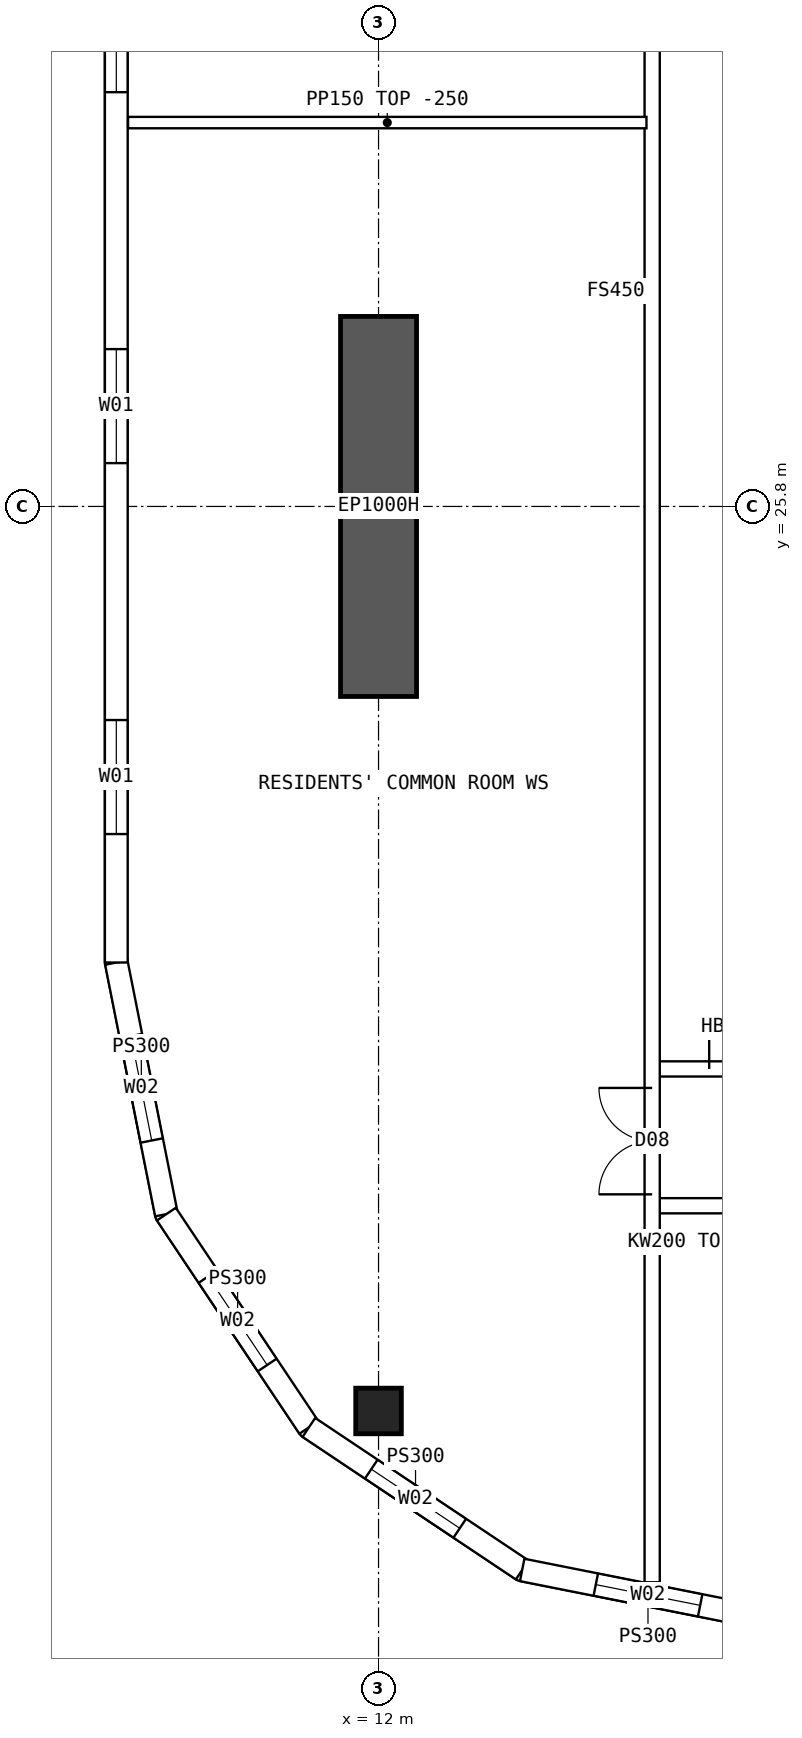
"""IFC4 building model, lengths in metres.
Left out: names, types, materials, properties, quantities, classifications, styles, units other than length and angle.
Written with IfcOpenShell. Run it as: python <this file> out.ifc"""

import sys

from ifc_helpers import new_model, si_unit, direction, frame, frame_2d, origin, origin_2d, place, context, subcontext, project, spatial, polyline, rectangle, hollow_rectangle, outline, extrude, element, fill, save


model = new_model("IFC4")
c1 = context("Model", 3, precision=1e-05, world=origin(), true_north=direction((0.0, 1.0)))
c2 = subcontext(c1, "Body", "Model", "MODEL_VIEW")
j1 = project(units=[si_unit("LENGTHUNIT", "METRE"), si_unit("PLANEANGLEUNIT", "RADIAN")], contexts=[c1])
p1 = place(None, origin())
s1 = spatial("IfcSite", under=j1, at=p1, CompositionType="ELEMENT")
p2 = place(p1, origin())
s2 = spatial("IfcBuilding", under=s1, at=p2, CompositionType="ELEMENT")
p3 = place(p2, frame((0.0, 0.0, 246.55)))
s3 = spatial("IfcBuildingStorey", under=s2, at=p3, CompositionType="ELEMENT", Elevation=246.55)
p4 = place(p3, frame((12.0, 13.9, 0.0), z_axis=(0.0, 0.0, 1.0), x_axis=(1.0, 0.0, 0.0)))
e1 = element("IfcColumn", 1, at=p4, inside=s3, PredefinedType="COLUMN", context=c2, shape_type="SweptSolid", body=[
    extrude(hollow_rectangle(XDim=0.6, YDim=0.6, WallThickness=0.06, at=origin_2d()), origin(), (0.0, 0.0, 1.0), 3.75),
])
p5 = place(p3, frame((12.0, 23.3, 0.0), z_axis=(0.0, 0.0, 1.0), x_axis=(0.0, 1.0, 0.0)))
e2 = element("IfcWall", 2, at=p5, inside=s3, PredefinedType="SHEAR", context=c2, shape_type="SweptSolid", body=[
    extrude(rectangle(XDim=5.0, YDim=1.0, at=frame_2d((2.5, 0.0))), origin(), (0.0, 0.0, 1.0), 3.75),
])
p6 = place(p3, frame((8.55, 44.2, 0.0), z_axis=(0.0, 0.0, 1.0), x_axis=(0.0, -1.0, 0.0)))
e3 = element("IfcWall", 3, at=p6, inside=s3, PredefinedType="SOLIDWALL", context=c2, shape_type="SweptSolid", body=[
    extrude(outline(polyline([(-0.015, -0.15), (24.415, -0.15), (24.385, 0.15), (0.015, 0.15), (-0.015, -0.15)])), origin(), (0.0, 0.0, 1.0), 3.5),
])
p7 = place(p6, frame((1.69, 0.0, 0.9)))
e4 = element("IfcOpeningElement", 4, at=p7, cuts=e3, PredefinedType="OPENING", context=c2, shape_type="SweptSolid", body=[
    extrude(rectangle(XDim=1.5, YDim=2.0, at=frame_2d((0.75, 1.0))), frame((0.0, 0.16, 0.0), z_axis=(0.0, -1.0, 0.0), x_axis=(1.0, 0.0, 0.0)), (0.0, 0.0, 1.0), 0.32),
])
p8 = place(p6, frame((6.57, 0.0, 0.9)))
e5 = element("IfcOpeningElement", 5, at=p8, cuts=e3, PredefinedType="OPENING", context=c2, shape_type="SweptSolid", body=[
    extrude(rectangle(XDim=1.5, YDim=2.0, at=frame_2d((0.75, 1.0))), frame((0.0, 0.16, 0.0), z_axis=(0.0, -1.0, 0.0), x_axis=(1.0, 0.0, 0.0)), (0.0, 0.0, 1.0), 0.32),
])
p9 = place(p6, frame((11.45, 0.0, 0.9)))
e6 = element("IfcOpeningElement", 6, at=p9, cuts=e3, PredefinedType="OPENING", context=c2, shape_type="SweptSolid", body=[
    extrude(rectangle(XDim=1.5, YDim=2.0, at=frame_2d((0.75, 1.0))), frame((0.0, 0.16, 0.0), z_axis=(0.0, -1.0, 0.0), x_axis=(1.0, 0.0, 0.0)), (0.0, 0.0, 1.0), 0.32),
])
p10 = place(p6, frame((16.33, 0.0, 0.9)))
e7 = element("IfcOpeningElement", 7, at=p10, cuts=e3, PredefinedType="OPENING", context=c2, shape_type="SweptSolid", body=[
    extrude(rectangle(XDim=1.5, YDim=2.0, at=frame_2d((0.75, 1.0))), frame((0.0, 0.16, 0.0), z_axis=(0.0, -1.0, 0.0), x_axis=(1.0, 0.0, 0.0)), (0.0, 0.0, 1.0), 0.32),
])
p11 = place(p6, frame((21.21, 0.0, 0.9)))
e8 = element("IfcOpeningElement", 8, at=p11, cuts=e3, PredefinedType="OPENING", context=c2, shape_type="SweptSolid", body=[
    extrude(rectangle(XDim=1.5, YDim=2.0, at=frame_2d((0.75, 1.0))), frame((0.0, 0.16, 0.0), z_axis=(0.0, -1.0, 0.0), x_axis=(1.0, 0.0, 0.0)), (0.0, 0.0, 1.0), 0.32),
])
p12 = place(p3, frame((8.55, 19.8, 0.0), z_axis=(0.0, 0.0, 1.0), x_axis=(0.19508664885, -0.980786011034, 0.0)))
e9 = element("IfcWall", 9, at=p12, inside=s3, PredefinedType="SOLIDWALL", context=c2, shape_type="SweptSolid", body=[
    extrude(outline(polyline([(-0.015, -0.15), (3.405, -0.15), (3.345, 0.15), (0.015, 0.15), (-0.015, -0.15)])), origin(), (0.0, 0.0, 1.0), 3.5),
])
p13 = place(p12, frame((0.988, 0.0, 0.9)))
e10 = element("IfcOpeningElement", 10, at=p13, cuts=e9, PredefinedType="OPENING", context=c2, shape_type="SweptSolid", body=[
    extrude(rectangle(XDim=1.4, YDim=1.8, at=frame_2d((0.7, 0.9))), frame((0.0, 0.16, 0.0), z_axis=(0.0, -1.0, 0.0), x_axis=(1.0, 0.0, 0.0)), (0.0, 0.0, 1.0), 0.32),
])
p14 = place(p3, frame((9.208, 16.49, 0.0), z_axis=(0.0, 0.0, 1.0), x_axis=(0.555567969291, -0.831471124873, 0.0)))
e11 = element("IfcWall", 11, at=p14, inside=s3, PredefinedType="SOLIDWALL", context=c2, shape_type="SweptSolid", body=[
    extrude(outline(polyline([(-0.03, -0.15), (3.405, -0.15), (3.345, 0.15), (0.03, 0.15), (-0.03, -0.15)])), origin(), (0.0, 0.0, 1.0), 3.5),
])
p15 = place(p14, frame((0.988, 0.0, 0.9)))
e12 = element("IfcOpeningElement", 12, at=p15, cuts=e11, PredefinedType="OPENING", context=c2, shape_type="SweptSolid", body=[
    extrude(rectangle(XDim=1.4, YDim=1.8, at=frame_2d((0.7, 0.9))), frame((0.0, 0.16, 0.0), z_axis=(0.0, -1.0, 0.0), x_axis=(1.0, 0.0, 0.0)), (0.0, 0.0, 1.0), 0.32),
])
p16 = place(p3, frame((11.083, 13.684, 0.0), z_axis=(0.0, 0.0, 1.0), x_axis=(0.831460037396, -0.555584562613, 0.0)))
e13 = element("IfcWall", 13, at=p16, inside=s3, PredefinedType="SOLIDWALL", context=c2, shape_type="SweptSolid", body=[
    extrude(outline(polyline([(-0.03, -0.15), (3.405, -0.15), (3.345, 0.15), (0.03, 0.15), (-0.03, -0.15)])), origin(), (0.0, 0.0, 1.0), 3.5),
])
p17 = place(p16, frame((0.988, 0.0, 0.9)))
e14 = element("IfcOpeningElement", 14, at=p17, cuts=e13, PredefinedType="OPENING", context=c2, shape_type="SweptSolid", body=[
    extrude(rectangle(XDim=1.4, YDim=1.8, at=frame_2d((0.7, 0.9))), frame((0.0, 0.16, 0.0), z_axis=(0.0, -1.0, 0.0), x_axis=(1.0, 0.0, 0.0)), (0.0, 0.0, 1.0), 0.32),
])
p18 = place(p3, frame((13.89, 11.808, 0.0), z_axis=(0.0, 0.0, 1.0), x_axis=(0.98078325777, -0.195100490205, 0.0)))
e15 = element("IfcWall", 15, at=p18, inside=s3, PredefinedType="SOLIDWALL", context=c2, shape_type="SweptSolid", body=[
    extrude(outline(polyline([(-0.03, -0.15), (3.405, -0.15), (3.345, 0.15), (0.03, 0.15), (-0.03, -0.15)])), origin(), (0.0, 0.0, 1.0), 3.5),
])
p19 = place(p18, frame((0.988, 0.0, 0.9)))
e16 = element("IfcOpeningElement", 16, at=p19, cuts=e15, PredefinedType="OPENING", context=c2, shape_type="SweptSolid", body=[
    extrude(rectangle(XDim=1.4, YDim=1.8, at=frame_2d((0.7, 0.9))), frame((0.0, 0.16, 0.0), z_axis=(0.0, -1.0, 0.0), x_axis=(1.0, 0.0, 0.0)), (0.0, 0.0, 1.0), 0.32),
])
p20 = place(p3, frame((15.6, 16.6, 0.0), z_axis=(0.0, 0.0, 1.0), x_axis=(1.0, 0.0, 0.0)))
e17 = element("IfcWall", 17, at=p20, inside=s3, PredefinedType="SOLIDWALL", context=c2, shape_type="SweptSolid", body=[
    extrude(rectangle(XDim=2.05, YDim=0.2, at=frame_2d((1.025, 0.0))), origin(), (0.0, 0.0, 1.0), 3.5),
])
p21 = place(p20, frame((0.95, 0.0, 0.0)))
e18 = element("IfcOpeningElement", 18, at=p21, cuts=e17, PredefinedType="OPENING", context=c2, shape_type="SweptSolid", body=[
    extrude(rectangle(XDim=0.9, YDim=2.1, at=frame_2d((0.45, 1.05))), frame((0.0, 0.11, 0.0), z_axis=(0.0, -1.0, 0.0), x_axis=(1.0, 0.0, 0.0)), (0.0, 0.0, 1.0), 0.22),
])
p22 = place(p3, frame((15.6, 18.4, 0.0), z_axis=(0.0, 0.0, 1.0), x_axis=(1.0, 0.0, 0.0)))
e19 = element("IfcWall", 19, at=p22, inside=s3, PredefinedType="SOLIDWALL", context=c2, shape_type="SweptSolid", body=[
    extrude(rectangle(XDim=2.05, YDim=0.2, at=frame_2d((1.025, 0.0))), origin(), (0.0, 0.0, 1.0), 3.5),
])
p23 = place(p22, frame((0.75, 0.0, 0.0)))
e20 = element("IfcOpeningElement", 20, at=p23, cuts=e19, PredefinedType="OPENING", context=c2, shape_type="SweptSolid", body=[
    extrude(rectangle(XDim=1.2, YDim=2.1, at=frame_2d((0.6, 1.05))), frame((0.0, 0.11, 0.0), z_axis=(0.0, -1.0, 0.0), x_axis=(1.0, 0.0, 0.0)), (0.0, 0.0, 1.0), 0.22),
])
p24 = place(p3, frame((8.705, 30.85, 0.0), z_axis=(0.0, 0.0, 1.0), x_axis=(1.0, 0.0, 0.0)))
e21 = element("IfcWall", 21, at=p24, inside=s3, PredefinedType="PARTITIONING", context=c2, shape_type="SweptSolid", body=[
    extrude(outline(polyline([(0.0, 0.0), (6.82, 0.0), (6.82, 3.5), (3.597, 3.5), (3.595, 3.05), (2.997, 3.05), (2.995, 3.5), (0.0, 3.5), (0.0, 0.0)])), frame((0.0, 0.075, 0.0), z_axis=(0.0, -1.0, 0.0), x_axis=(1.0, 0.0, 0.0)), (0.0, 0.0, 1.0), 0.15),
])
p25 = place(p3, frame((15.6, 11.646, 0.0), z_axis=(0.0, 0.0, 1.0), x_axis=(0.0, 1.0, 0.0)))
e22 = element("IfcWall", 22, at=p25, inside=s3, PredefinedType="SOLIDWALL", context=c2, shape_type="SweptSolid", body=[
    extrude(rectangle(XDim=40.708, YDim=0.2, at=frame_2d((20.354, 0.0))), origin(), (0.0, 0.0, 1.0), 3.5),
])
p26 = place(p25, frame((5.104, 0.0, 0.0)))
e23 = element("IfcOpeningElement", 23, at=p26, cuts=e22, PredefinedType="OPENING", context=c2, shape_type="SweptSolid", body=[
    extrude(rectangle(XDim=1.4, YDim=2.1, at=frame_2d((0.7, 1.05))), frame((0.0, 0.11, 0.0), z_axis=(0.0, -1.0, 0.0), x_axis=(1.0, 0.0, 0.0)), (0.0, 0.0, 1.0), 0.22),
])
p27 = place(p25, frame((34.104, 0.0, 0.0)))
e24 = element("IfcOpeningElement", 24, at=p27, cuts=e22, PredefinedType="OPENING", context=c2, shape_type="SweptSolid", body=[
    extrude(rectangle(XDim=1.4, YDim=2.1, at=frame_2d((0.7, 1.05))), frame((0.0, 0.11, 0.0), z_axis=(0.0, -1.0, 0.0), x_axis=(1.0, 0.0, 0.0)), (0.0, 0.0, 1.0), 0.22),
])
p28 = place(p9, origin())
e25 = element("IfcWindow", 25, at=p28, inside=s3, PartitioningType="SINGLE_PANEL", PredefinedType="WINDOW", context=c2, shape_type="SweptSolid", body=[
    extrude(rectangle(XDim=1.5, YDim=2.0, at=frame_2d((0.75, 1.0))), frame((0.0, 0.03, 0.0), z_axis=(0.0, -1.0, 0.0), x_axis=(1.0, 0.0, 0.0)), (0.0, 0.0, 1.0), 0.06),
])
fill(e6, e25)
p29 = place(p10, origin())
e26 = element("IfcWindow", 26, at=p29, inside=s3, PartitioningType="SINGLE_PANEL", PredefinedType="WINDOW", context=c2, shape_type="SweptSolid", body=[
    extrude(rectangle(XDim=1.5, YDim=2.0, at=frame_2d((0.75, 1.0))), frame((0.0, 0.03, 0.0), z_axis=(0.0, -1.0, 0.0), x_axis=(1.0, 0.0, 0.0)), (0.0, 0.0, 1.0), 0.06),
])
fill(e7, e26)
p30 = place(p11, origin())
e27 = element("IfcWindow", 27, at=p30, inside=s3, PartitioningType="SINGLE_PANEL", PredefinedType="WINDOW", context=c2, shape_type="SweptSolid", body=[
    extrude(rectangle(XDim=1.5, YDim=2.0, at=frame_2d((0.75, 1.0))), frame((0.0, 0.03, 0.0), z_axis=(0.0, -1.0, 0.0), x_axis=(1.0, 0.0, 0.0)), (0.0, 0.0, 1.0), 0.06),
])
fill(e8, e27)
p31 = place(p13, origin())
e28 = element("IfcWindow", 28, at=p31, inside=s3, PartitioningType="SINGLE_PANEL", PredefinedType="WINDOW", context=c2, shape_type="SweptSolid", body=[
    extrude(rectangle(XDim=1.4, YDim=1.8, at=frame_2d((0.7, 0.9))), frame((0.0, 0.03, 0.0), z_axis=(0.0, -1.0, 0.0), x_axis=(1.0, 0.0, 0.0)), (0.0, 0.0, 1.0), 0.06),
])
fill(e10, e28)
p32 = place(p15, origin())
e29 = element("IfcWindow", 29, at=p32, inside=s3, PartitioningType="SINGLE_PANEL", PredefinedType="WINDOW", context=c2, shape_type="SweptSolid", body=[
    extrude(rectangle(XDim=1.4, YDim=1.8, at=frame_2d((0.7, 0.9))), frame((0.0, 0.03, 0.0), z_axis=(0.0, -1.0, 0.0), x_axis=(1.0, 0.0, 0.0)), (0.0, 0.0, 1.0), 0.06),
])
fill(e12, e29)
p33 = place(p17, origin())
e30 = element("IfcWindow", 30, at=p33, inside=s3, PartitioningType="SINGLE_PANEL", PredefinedType="WINDOW", context=c2, shape_type="SweptSolid", body=[
    extrude(rectangle(XDim=1.4, YDim=1.8, at=frame_2d((0.7, 0.9))), frame((0.0, 0.03, 0.0), z_axis=(0.0, -1.0, 0.0), x_axis=(1.0, 0.0, 0.0)), (0.0, 0.0, 1.0), 0.06),
])
fill(e14, e30)
p34 = place(p19, origin())
e31 = element("IfcWindow", 31, at=p34, inside=s3, PartitioningType="SINGLE_PANEL", PredefinedType="WINDOW", context=c2, shape_type="SweptSolid", body=[
    extrude(rectangle(XDim=1.4, YDim=1.8, at=frame_2d((0.7, 0.9))), frame((0.0, 0.03, 0.0), z_axis=(0.0, -1.0, 0.0), x_axis=(1.0, 0.0, 0.0)), (0.0, 0.0, 1.0), 0.06),
])
fill(e16, e31)
p35 = place(p23, origin())
e32 = element("IfcDoor", 32, at=p35, inside=s3, OperationType="DOUBLE_DOOR_SINGLE_SWING", PredefinedType="DOOR", context=c2, shape_type="SweptSolid", body=[
    extrude(rectangle(XDim=1.2, YDim=2.1, at=frame_2d((0.6, 1.05))), frame((0.0, 0.025, 0.0), z_axis=(0.0, -1.0, 0.0), x_axis=(1.0, 0.0, 0.0)), (0.0, 0.0, 1.0), 0.05),
])
fill(e20, e32)
p36 = place(p26, origin())
e33 = element("IfcDoor", 33, at=p36, inside=s3, OperationType="DOUBLE_DOOR_SINGLE_SWING", PredefinedType="DOOR", context=c2, shape_type="SweptSolid", body=[
    extrude(rectangle(XDim=1.4, YDim=2.1, at=frame_2d((0.7, 1.05))), frame((0.0, 0.025, 0.0), z_axis=(0.0, -1.0, 0.0), x_axis=(1.0, 0.0, 0.0)), (0.0, 0.0, 1.0), 0.05),
])
fill(e23, e33)
save(model, sys.argv[1])
